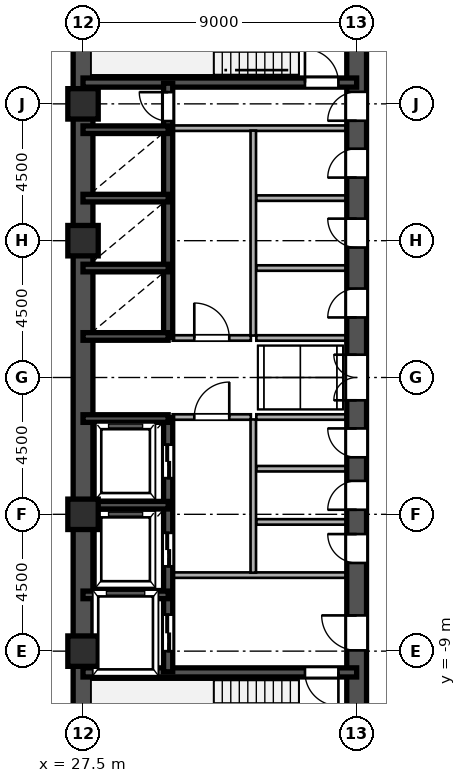
"""IFC4 building model, lengths in metres.
Left out: names, types, materials, properties, quantities, classifications, styles, units other than length and angle.
Written with IfcOpenShell. Run it as: python <this file> out.ifc"""

import sys

from ifc_helpers import new_model, si_unit, direction, frame, frame_2d, origin, origin_2d, place, context, subcontext, project, spatial, rectangle, hollow_rectangle, extrude, source, transform, mapped, element, fill, save


model = new_model("IFC4")
c1 = context("Model", 3, precision=1e-05, world=origin(), true_north=direction((0.0, 1.0)))
c2 = subcontext(c1, "Body", "Model", "MODEL_VIEW")
j1 = project(units=[si_unit("LENGTHUNIT", "METRE"), si_unit("PLANEANGLEUNIT", "RADIAN")], contexts=[c1])
p1 = place(None, origin())
s1 = spatial("IfcSite", under=j1, at=p1, CompositionType="ELEMENT")
p2 = place(p1, origin())
s2 = spatial("IfcBuilding", under=s1, at=p2, CompositionType="ELEMENT")
p3 = place(p2, frame((0.0, 0.0, 99.6)))
s3 = spatial("IfcBuildingStorey", under=s2, at=p3, CompositionType="ELEMENT", Elevation=99.6)
m1 = source(origin(), c2, "Body", "SweptSolid", [
    extrude(hollow_rectangle(XDim=1.0, YDim=1.0, WallThickness=0.042, at=origin_2d()), origin(), (0.0, 0.0, 1.0), 3.6),
])
for number, where, z_axis, x_axis in (
    (1, (27.5, -9.0, 0.0), (0.0, 0.0, 1.0), (1.0, 0.0, 0.0)),
    (2, (27.5, -4.5, 0.0), (0.0, 0.0, 1.0), (1.0, 0.0, 0.0)),
    (3, (27.5, 4.5, 0.0), (0.0, 0.0, 1.0), (1.0, 0.0, 0.0)),
    (4, (27.5, 9.0, 0.0), (0.0, 0.0, 1.0), (1.0, 0.0, 0.0)),
):
    element("IfcColumn", number, at=place(p3, frame(where, z_axis=z_axis, x_axis=x_axis)), inside=s3, PredefinedType="COLUMN", context=c2, shape_type="MappedRepresentation", body=[
        mapped(m1, transform((0.0, 0.0, 0.0), scale=1.0)),
    ])
for number, where, z_axis, x_axis in (
    (5, (27.5, -13.5, 0.0), (0.0, 0.0, 1.0), (0.0, 1.0, 0.0)),
    (6, (27.5, 1.3, 0.0), (0.0, 0.0, 1.0), (0.0, 1.0, 0.0)),
):
    element("IfcWall", number, at=place(p3, frame(where, z_axis=z_axis, x_axis=x_axis)), inside=s3, PredefinedType="SHEAR", context=c2, shape_type="SweptSolid", body=[
        extrude(rectangle(XDim=12.2, YDim=0.65, at=frame_2d((6.1, 0.0))), origin(), (0.0, 0.0, 1.0), 3.38),
    ])
p4 = place(p3, frame((27.5, -1.3, 0.0), z_axis=(0.0, 0.0, 1.0), x_axis=(0.0, 1.0, 0.0)))
e7 = element("IfcWall", 7, at=p4, inside=s3, PredefinedType="SHEAR", context=c2, shape_type="SweptSolid", body=[
    extrude(rectangle(XDim=2.6, YDim=0.65, at=frame_2d((1.3, 0.0))), origin(), (0.0, 0.0, 1.0), 3.38),
])
p5 = place(p3, frame((36.5, -13.65, 0.0), z_axis=(0.0, 0.0, 1.0), x_axis=(0.0, 1.0, 0.0)))
e8 = element("IfcWall", 8, at=p5, inside=s3, PredefinedType="SHEAR", context=c2, shape_type="SweptSolid", body=[
    extrude(rectangle(XDim=7.15, YDim=0.65, at=frame_2d((3.575, 0.0))), origin(), (0.0, 0.0, 1.0), 3.38),
])
p6 = place(p5, frame((4.675, 0.0, 0.0)))
e9 = element("IfcOpeningElement", 9, at=p6, cuts=e8, PredefinedType="OPENING", context=c2, shape_type="SweptSolid", body=[
    extrude(rectangle(XDim=1.15, YDim=2.2, at=frame_2d((0.575, 1.1))), frame((0.0, 0.335, 0.0), z_axis=(0.0, -1.0, 0.0), x_axis=(1.0, 0.0, 0.0)), (0.0, 0.0, 1.0), 0.67),
])
p7 = place(p3, frame((36.5, -1.3, 0.0), z_axis=(0.0, 0.0, 1.0), x_axis=(0.0, 1.0, 0.0)))
e10 = element("IfcWall", 10, at=p7, inside=s3, PredefinedType="SHEAR", context=c2, shape_type="SweptSolid", body=[
    extrude(rectangle(XDim=2.6, YDim=0.65, at=frame_2d((1.3, 0.0))), origin(), (0.0, 0.0, 1.0), 3.38),
])
p8 = place(p7, frame((0.55, 0.0, 0.0)))
e11 = element("IfcOpeningElement", 11, at=p8, cuts=e10, PredefinedType="OPENING", context=c2, shape_type="SweptSolid", body=[
    extrude(rectangle(XDim=1.5, YDim=2.3, at=frame_2d((0.75, 1.15))), frame((0.0, 0.335, 0.0), z_axis=(0.0, -1.0, 0.0), x_axis=(1.0, 0.0, 0.0)), (0.0, 0.0, 1.0), 0.67),
])
p9 = place(p3, frame((36.5, 8.2, 0.0), z_axis=(0.0, 0.0, 1.0), x_axis=(0.0, 1.0, 0.0)))
e12 = element("IfcWall", 12, at=p9, inside=s3, PredefinedType="SHEAR", context=c2, shape_type="SweptSolid", body=[
    extrude(rectangle(XDim=5.45, YDim=0.65, at=frame_2d((2.725, 0.0))), origin(), (0.0, 0.0, 1.0), 3.38),
])
p10 = place(p9, frame((0.245, 0.0, 0.0)))
e13 = element("IfcOpeningElement", 13, at=p10, cuts=e12, PredefinedType="OPENING", context=c2, shape_type="SweptSolid", body=[
    extrude(rectangle(XDim=0.95, YDim=2.15, at=frame_2d((0.475, 1.075))), frame((0.0, 0.335, 0.0), z_axis=(0.0, -1.0, 0.0), x_axis=(1.0, 0.0, 0.0)), (0.0, 0.0, 1.0), 0.67),
])
p11 = place(p3, frame((36.5, -6.5, 0.0), z_axis=(0.0, 0.0, 1.0), x_axis=(0.0, 1.0, 0.0)))
e14 = element("IfcWall", 14, at=p11, inside=s3, PredefinedType="SHEAR", context=c2, shape_type="SweptSolid", body=[
    extrude(rectangle(XDim=1.75, YDim=0.65, at=frame_2d((0.875, 0.0))), origin(), (0.0, 0.0, 1.0), 3.38),
])
p12 = place(p11, frame((0.4, 0.0, 0.0)))
e15 = element("IfcOpeningElement", 15, at=p12, cuts=e14, PredefinedType="OPENING", context=c2, shape_type="SweptSolid", body=[
    extrude(rectangle(XDim=0.95, YDim=2.15, at=frame_2d((0.475, 1.075))), frame((0.0, 0.335, 0.0), z_axis=(0.0, -1.0, 0.0), x_axis=(1.0, 0.0, 0.0)), (0.0, 0.0, 1.0), 0.67),
])
p13 = place(p3, frame((36.5, -4.75, 0.0), z_axis=(0.0, 0.0, 1.0), x_axis=(0.0, 1.0, 0.0)))
e16 = element("IfcWall", 16, at=p13, inside=s3, PredefinedType="SHEAR", context=c2, shape_type="SweptSolid", body=[
    extrude(rectangle(XDim=1.75, YDim=0.65, at=frame_2d((0.875, 0.0))), origin(), (0.0, 0.0, 1.0), 3.38),
])
p14 = place(p13, frame((0.4, 0.0, 0.0)))
e17 = element("IfcOpeningElement", 17, at=p14, cuts=e16, PredefinedType="OPENING", context=c2, shape_type="SweptSolid", body=[
    extrude(rectangle(XDim=0.95, YDim=2.15, at=frame_2d((0.475, 1.075))), frame((0.0, 0.335, 0.0), z_axis=(0.0, -1.0, 0.0), x_axis=(1.0, 0.0, 0.0)), (0.0, 0.0, 1.0), 0.67),
])
p15 = place(p3, frame((36.5, -3.0, 0.0), z_axis=(0.0, 0.0, 1.0), x_axis=(0.0, 1.0, 0.0)))
e18 = element("IfcWall", 18, at=p15, inside=s3, PredefinedType="SHEAR", context=c2, shape_type="SweptSolid", body=[
    extrude(rectangle(XDim=1.7, YDim=0.65, at=frame_2d((0.85, 0.0))), origin(), (0.0, 0.0, 1.0), 3.38),
])
p16 = place(p15, frame((0.375, 0.0, 0.0)))
e19 = element("IfcOpeningElement", 19, at=p16, cuts=e18, PredefinedType="OPENING", context=c2, shape_type="SweptSolid", body=[
    extrude(rectangle(XDim=0.95, YDim=2.15, at=frame_2d((0.475, 1.075))), frame((0.0, 0.335, 0.0), z_axis=(0.0, -1.0, 0.0), x_axis=(1.0, 0.0, 0.0)), (0.0, 0.0, 1.0), 0.67),
])
p17 = place(p3, frame((36.5, 1.3, 0.0), z_axis=(0.0, 0.0, 1.0), x_axis=(0.0, 1.0, 0.0)))
e20 = element("IfcWall", 20, at=p17, inside=s3, PredefinedType="SHEAR", context=c2, shape_type="SweptSolid", body=[
    extrude(rectangle(XDim=2.3, YDim=0.65, at=frame_2d((1.15, 0.0))), origin(), (0.0, 0.0, 1.0), 3.38),
])
p18 = place(p17, frame((0.675, 0.0, 0.0)))
e21 = element("IfcOpeningElement", 21, at=p18, cuts=e20, PredefinedType="OPENING", context=c2, shape_type="SweptSolid", body=[
    extrude(rectangle(XDim=0.95, YDim=2.15, at=frame_2d((0.475, 1.075))), frame((0.0, 0.335, 0.0), z_axis=(0.0, -1.0, 0.0), x_axis=(1.0, 0.0, 0.0)), (0.0, 0.0, 1.0), 0.67),
])
p19 = place(p3, frame((36.5, 3.6, 0.0), z_axis=(0.0, 0.0, 1.0), x_axis=(0.0, 1.0, 0.0)))
e22 = element("IfcWall", 22, at=p19, inside=s3, PredefinedType="SHEAR", context=c2, shape_type="SweptSolid", body=[
    extrude(rectangle(XDim=2.3, YDim=0.65, at=frame_2d((1.15, 0.0))), origin(), (0.0, 0.0, 1.0), 3.38),
])
p20 = place(p19, frame((0.675, 0.0, 0.0)))
e23 = element("IfcOpeningElement", 23, at=p20, cuts=e22, PredefinedType="OPENING", context=c2, shape_type="SweptSolid", body=[
    extrude(rectangle(XDim=0.95, YDim=2.15, at=frame_2d((0.475, 1.075))), frame((0.0, 0.335, 0.0), z_axis=(0.0, -1.0, 0.0), x_axis=(1.0, 0.0, 0.0)), (0.0, 0.0, 1.0), 0.67),
])
p21 = place(p3, frame((36.5, 5.9, 0.0), z_axis=(0.0, 0.0, 1.0), x_axis=(0.0, 1.0, 0.0)))
e24 = element("IfcWall", 24, at=p21, inside=s3, PredefinedType="SHEAR", context=c2, shape_type="SweptSolid", body=[
    extrude(rectangle(XDim=2.3, YDim=0.65, at=frame_2d((1.15, 0.0))), origin(), (0.0, 0.0, 1.0), 3.38),
])
p22 = place(p21, frame((0.675, 0.0, 0.0)))
e25 = element("IfcOpeningElement", 25, at=p22, cuts=e24, PredefinedType="OPENING", context=c2, shape_type="SweptSolid", body=[
    extrude(rectangle(XDim=0.95, YDim=2.15, at=frame_2d((0.475, 1.075))), frame((0.0, 0.335, 0.0), z_axis=(0.0, -1.0, 0.0), x_axis=(1.0, 0.0, 0.0)), (0.0, 0.0, 1.0), 0.67),
])
p23 = place(p3, frame((27.5, -9.7, 0.0), z_axis=(0.0, 0.0, 1.0), x_axis=(1.0, 0.0, 0.0)))
e26 = element("IfcWall", 26, at=p23, inside=s3, PredefinedType="SHEAR", context=c2, shape_type="SweptSolid", body=[
    extrude(rectangle(XDim=9.0, YDim=0.3, at=frame_2d((4.5, 0.0))), origin(), (0.0, 0.0, 1.0), 3.38),
])
p24 = place(p23, frame((7.3, 0.0, 0.0)))
e27 = element("IfcOpeningElement", 27, at=p24, cuts=e26, PredefinedType="OPENING", context=c2, shape_type="SweptSolid", body=[
    extrude(rectangle(XDim=1.1, YDim=2.2, at=frame_2d((0.55, 1.1))), frame((0.0, 0.16, 0.0), z_axis=(0.0, -1.0, 0.0), x_axis=(1.0, 0.0, 0.0)), (0.0, 0.0, 1.0), 0.32),
])
p25 = place(p3, frame((27.5, 9.7, 0.0), z_axis=(0.0, 0.0, 1.0), x_axis=(1.0, 0.0, 0.0)))
e28 = element("IfcWall", 28, at=p25, inside=s3, PredefinedType="SHEAR", context=c2, shape_type="SweptSolid", body=[
    extrude(rectangle(XDim=9.0, YDim=0.3, at=frame_2d((4.5, 0.0))), origin(), (0.0, 0.0, 1.0), 3.38),
])
p26 = place(p25, frame((7.3, 0.0, 0.0)))
e29 = element("IfcOpeningElement", 29, at=p26, cuts=e28, PredefinedType="OPENING", context=c2, shape_type="SweptSolid", body=[
    extrude(rectangle(XDim=1.1, YDim=2.2, at=frame_2d((0.55, 1.1))), frame((0.0, 0.16, 0.0), z_axis=(0.0, -1.0, 0.0), x_axis=(1.0, 0.0, 0.0)), (0.0, 0.0, 1.0), 0.32),
])
for number, where, z_axis, x_axis in (
    (30, (27.5, -7.15, 0.0), (0.0, 0.0, 1.0), (1.0, 0.0, 0.0)),
    (31, (27.5, -4.2, 0.0), (0.0, 0.0, 1.0), (1.0, 0.0, 0.0)),
    (32, (27.5, -1.35, 0.0), (0.0, 0.0, 1.0), (1.0, 0.0, 0.0)),
    (33, (27.5, 1.35, 0.0), (0.0, 0.0, 1.0), (1.0, 0.0, 0.0)),
    (34, (27.5, 3.6, 0.0), (0.0, 0.0, 1.0), (1.0, 0.0, 0.0)),
    (35, (27.5, 5.9, 0.0), (0.0, 0.0, 1.0), (1.0, 0.0, 0.0)),
    (36, (27.5, 8.15, 0.0), (0.0, 0.0, 1.0), (1.0, 0.0, 0.0)),
):
    element("IfcWall", number, at=place(p3, frame(where, z_axis=z_axis, x_axis=x_axis)), inside=s3, PredefinedType="SHEAR", context=c2, shape_type="SweptSolid", body=[
        extrude(rectangle(XDim=2.8, YDim=0.25, at=frame_2d((1.4, 0.0))), origin(), (0.0, 0.0, 1.0), 3.38),
    ])
p27 = place(p3, frame((30.3, -9.68, 0.0), z_axis=(0.0, 0.0, 1.0), x_axis=(0.0, 1.0, 0.0)))
e37 = element("IfcWall", 37, at=p27, inside=s3, PredefinedType="SHEAR", context=c2, shape_type="SweptSolid", body=[
    extrude(rectangle(XDim=2.56, YDim=0.3, at=frame_2d((1.28, 0.0))), origin(), (0.0, 0.0, 1.0), 3.38),
])
p28 = place(p27, frame((0.68, 0.0, 0.0)))
e38 = element("IfcOpeningElement", 38, at=p28, cuts=e37, PredefinedType="OPENING", context=c2, shape_type="SweptSolid", body=[
    extrude(rectangle(XDim=1.2, YDim=2.25, at=frame_2d((0.6, 1.125))), frame((0.0, 0.16, 0.0), z_axis=(0.0, -1.0, 0.0), x_axis=(1.0, 0.0, 0.0)), (0.0, 0.0, 1.0), 0.32),
])
p29 = place(p3, frame((30.3, -7.12, 0.0), z_axis=(0.0, 0.0, 1.0), x_axis=(0.0, 1.0, 0.0)))
e39 = element("IfcWall", 39, at=p29, inside=s3, PredefinedType="SHEAR", context=c2, shape_type="SweptSolid", body=[
    extrude(rectangle(XDim=2.92, YDim=0.3, at=frame_2d((1.46, 0.0))), origin(), (0.0, 0.0, 1.0), 3.38),
])
p30 = place(p29, frame((0.91, 0.0, 0.0)))
e40 = element("IfcOpeningElement", 40, at=p30, cuts=e39, PredefinedType="OPENING", context=c2, shape_type="SweptSolid", body=[
    extrude(rectangle(XDim=1.1, YDim=2.2, at=frame_2d((0.55, 1.1))), frame((0.0, 0.16, 0.0), z_axis=(0.0, -1.0, 0.0), x_axis=(1.0, 0.0, 0.0)), (0.0, 0.0, 1.0), 0.32),
])
p31 = place(p3, frame((30.3, -4.2, 0.0), z_axis=(0.0, 0.0, 1.0), x_axis=(0.0, 1.0, 0.0)))
e41 = element("IfcWall", 41, at=p31, inside=s3, PredefinedType="SHEAR", context=c2, shape_type="SweptSolid", body=[
    extrude(rectangle(XDim=2.88, YDim=0.3, at=frame_2d((1.44, 0.0))), origin(), (0.0, 0.0, 1.0), 3.38),
])
p32 = place(p31, frame((0.89, 0.0, 0.0)))
e42 = element("IfcOpeningElement", 42, at=p32, cuts=e41, PredefinedType="OPENING", context=c2, shape_type="SweptSolid", body=[
    extrude(rectangle(XDim=1.1, YDim=2.2, at=frame_2d((0.55, 1.1))), frame((0.0, 0.16, 0.0), z_axis=(0.0, -1.0, 0.0), x_axis=(1.0, 0.0, 0.0)), (0.0, 0.0, 1.0), 0.32),
])
p33 = place(p3, frame((30.3, 1.32, 0.0), z_axis=(0.0, 0.0, 1.0), x_axis=(0.0, 1.0, 0.0)))
e43 = element("IfcWall", 43, at=p33, inside=s3, PredefinedType="SHEAR", context=c2, shape_type="SweptSolid", body=[
    extrude(rectangle(XDim=2.28, YDim=0.3, at=frame_2d((1.14, 0.0))), origin(), (0.0, 0.0, 1.0), 3.38),
])
p34 = place(p3, frame((30.3, 3.6, 0.0), z_axis=(0.0, 0.0, 1.0), x_axis=(0.0, 1.0, 0.0)))
e44 = element("IfcWall", 44, at=p34, inside=s3, PredefinedType="SHEAR", context=c2, shape_type="SweptSolid", body=[
    extrude(rectangle(XDim=2.3, YDim=0.3, at=frame_2d((1.15, 0.0))), origin(), (0.0, 0.0, 1.0), 3.38),
])
p35 = place(p3, frame((30.3, 5.9, 0.0), z_axis=(0.0, 0.0, 1.0), x_axis=(0.0, 1.0, 0.0)))
e45 = element("IfcWall", 45, at=p35, inside=s3, PredefinedType="SHEAR", context=c2, shape_type="SweptSolid", body=[
    extrude(rectangle(XDim=2.25, YDim=0.3, at=frame_2d((1.125, 0.0))), origin(), (0.0, 0.0, 1.0), 3.38),
])
p36 = place(p3, frame((30.3, 8.15, 0.0), z_axis=(0.0, 0.0, 1.0), x_axis=(0.0, 1.0, 0.0)))
e46 = element("IfcWall", 46, at=p36, inside=s3, PredefinedType="SHEAR", context=c2, shape_type="SweptSolid", body=[
    extrude(rectangle(XDim=1.53, YDim=0.3, at=frame_2d((0.765, 0.0))), origin(), (0.0, 0.0, 1.0), 3.38),
])
p37 = place(p36, frame((0.285, 0.0, 0.0)))
e47 = element("IfcOpeningElement", 47, at=p37, cuts=e46, PredefinedType="OPENING", context=c2, shape_type="SweptSolid", body=[
    extrude(rectangle(XDim=0.95, YDim=2.15, at=frame_2d((0.475, 1.075))), frame((0.0, 0.16, 0.0), z_axis=(0.0, -1.0, 0.0), x_axis=(1.0, 0.0, 0.0)), (0.0, 0.0, 1.0), 0.32),
])
for number, where, z_axis, x_axis in (
    (48, (30.45, -6.5, 0.0), (0.0, 0.0, 1.0), (1.0, 0.0, 0.0)),
    (49, (30.45, 8.2, 0.0), (0.0, 0.0, 1.0), (1.0, 0.0, 0.0)),
):
    element("IfcWall", number, at=place(p3, frame(where, z_axis=z_axis, x_axis=x_axis)), inside=s3, PredefinedType="PARTITIONING", context=c2, shape_type="SweptSolid", body=[
        extrude(rectangle(XDim=5.7, YDim=0.18, at=frame_2d((2.85, 0.0))), origin(), (0.0, 0.0, 1.0), 3.38),
    ])
p38 = place(p3, frame((33.1, -6.42, 0.0), z_axis=(0.0, 0.0, 1.0), x_axis=(0.0, 1.0, 0.0)))
e50 = element("IfcWall", 50, at=p38, inside=s3, PredefinedType="PARTITIONING", context=c2, shape_type="SweptSolid", body=[
    extrude(rectangle(XDim=5.04, YDim=0.18, at=frame_2d((2.52, 0.0))), origin(), (0.0, 0.0, 1.0), 3.38),
])
p39 = place(p3, frame((33.1, 1.38, 0.0), z_axis=(0.0, 0.0, 1.0), x_axis=(0.0, 1.0, 0.0)))
e51 = element("IfcWall", 51, at=p39, inside=s3, PredefinedType="PARTITIONING", context=c2, shape_type="SweptSolid", body=[
    extrude(rectangle(XDim=6.74, YDim=0.18, at=frame_2d((3.37, 0.0))), origin(), (0.0, 0.0, 1.0), 3.38),
])
p40 = place(p3, frame((30.45, -1.3, 0.0), z_axis=(0.0, 0.0, 1.0), x_axis=(1.0, 0.0, 0.0)))
e52 = element("IfcWall", 52, at=p40, inside=s3, PredefinedType="PARTITIONING", context=c2, shape_type="SweptSolid", body=[
    extrude(rectangle(XDim=2.57, YDim=0.18, at=frame_2d((1.285, 0.0))), origin(), (0.0, 0.0, 1.0), 3.38),
])
p41 = place(p40, frame((0.71, 0.0, 0.0)))
e53 = element("IfcOpeningElement", 53, at=p41, cuts=e52, PredefinedType="OPENING", context=c2, shape_type="SweptSolid", body=[
    extrude(rectangle(XDim=1.15, YDim=2.2, at=frame_2d((0.575, 1.1))), frame((0.0, 0.1, 0.0), z_axis=(0.0, -1.0, 0.0), x_axis=(1.0, 0.0, 0.0)), (0.0, 0.0, 1.0), 0.2),
])
p42 = place(p3, frame((30.45, 1.3, 0.0), z_axis=(0.0, 0.0, 1.0), x_axis=(1.0, 0.0, 0.0)))
e54 = element("IfcWall", 54, at=p42, inside=s3, PredefinedType="PARTITIONING", context=c2, shape_type="SweptSolid", body=[
    extrude(rectangle(XDim=2.57, YDim=0.18, at=frame_2d((1.285, 0.0))), origin(), (0.0, 0.0, 1.0), 3.38),
])
p43 = place(p42, frame((0.71, 0.0, 0.0)))
e55 = element("IfcOpeningElement", 55, at=p43, cuts=e54, PredefinedType="OPENING", context=c2, shape_type="SweptSolid", body=[
    extrude(rectangle(XDim=1.15, YDim=2.2, at=frame_2d((0.575, 1.1))), frame((0.0, 0.1, 0.0), z_axis=(0.0, -1.0, 0.0), x_axis=(1.0, 0.0, 0.0)), (0.0, 0.0, 1.0), 0.2),
])
for number, where, z_axis, x_axis in (
    (56, (33.2, -1.3, 0.0), (0.0, 0.0, 1.0), (1.0, 0.0, 0.0)),
    (57, (33.2, 1.3, 0.0), (0.0, 0.0, 1.0), (1.0, 0.0, 0.0)),
    (58, (33.2, -4.75, 0.0), (0.0, 0.0, 1.0), (1.0, 0.0, 0.0)),
    (59, (33.2, -3.0, 0.0), (0.0, 0.0, 1.0), (1.0, 0.0, 0.0)),
    (60, (33.2, 3.6, 0.0), (0.0, 0.0, 1.0), (1.0, 0.0, 0.0)),
    (61, (33.2, 5.9, 0.0), (0.0, 0.0, 1.0), (1.0, 0.0, 0.0)),
):
    element("IfcWall", number, at=place(p3, frame(where, z_axis=z_axis, x_axis=x_axis)), inside=s3, PredefinedType="PARTITIONING", context=c2, shape_type="SweptSolid", body=[
        extrude(rectangle(XDim=2.95, YDim=0.18, at=frame_2d((1.475, 0.0))), origin(), (0.0, 0.0, 1.0), 3.38),
    ])
m2 = source(origin(), c2, "Body", "SweptSolid", [
    extrude(rectangle(XDim=1.15, YDim=2.2, at=frame_2d((0.575, 1.1))), frame((0.0, 0.025, 0.0), z_axis=(0.0, -1.0, 0.0), x_axis=(1.0, 0.0, 0.0)), (0.0, 0.0, 1.0), 0.05),
])
p44 = place(p6, origin())
e62 = element("IfcDoor", 62, at=p44, inside=s3, OperationType="SINGLE_SWING_RIGHT", PredefinedType="DOOR", context=c2, shape_type="MappedRepresentation", body=[
    mapped(m2, transform((0.0, 0.0, 0.0), scale=1.0)),
])
fill(e9, e62)
m3 = source(origin(), c2, "Body", "SweptSolid", [
    extrude(rectangle(XDim=1.5, YDim=2.3, at=frame_2d((0.75, 1.15))), frame((0.0, 0.025, 0.0), z_axis=(0.0, -1.0, 0.0), x_axis=(1.0, 0.0, 0.0)), (0.0, 0.0, 1.0), 0.05),
])
p45 = place(p8, origin())
e63 = element("IfcDoor", 63, at=p45, inside=s3, OperationType="DOUBLE_SWING_LEFT", PredefinedType="DOOR", context=c2, shape_type="MappedRepresentation", body=[
    mapped(m3, transform((0.0, 0.0, 0.0), scale=1.0)),
])
fill(e11, e63)
m4 = source(origin(), c2, "Body", "SweptSolid", [
    extrude(rectangle(XDim=0.95, YDim=2.15, at=frame_2d((0.475, 1.075))), frame((0.0, 0.025, 0.0), z_axis=(0.0, -1.0, 0.0), x_axis=(1.0, 0.0, 0.0)), (0.0, 0.0, 1.0), 0.05),
])
p46 = place(p10, origin())
e64 = element("IfcDoor", 64, at=p46, inside=s3, OperationType="SINGLE_SWING_LEFT", PredefinedType="DOOR", context=c2, shape_type="MappedRepresentation", body=[
    mapped(m4, transform((0.0, 0.0, 0.0), scale=1.0)),
])
fill(e13, e64)
p47 = place(p12, origin())
e65 = element("IfcDoor", 65, at=p47, inside=s3, OperationType="SINGLE_SWING_RIGHT", PredefinedType="DOOR", context=c2, shape_type="MappedRepresentation", body=[
    mapped(m4, transform((0.0, 0.0, 0.0), scale=1.0)),
])
fill(e15, e65)
p48 = place(p14, origin())
e66 = element("IfcDoor", 66, at=p48, inside=s3, OperationType="SINGLE_SWING_LEFT", PredefinedType="DOOR", context=c2, shape_type="MappedRepresentation", body=[
    mapped(m4, transform((0.0, 0.0, 0.0), scale=1.0)),
])
fill(e17, e66)
p49 = place(p16, origin())
e67 = element("IfcDoor", 67, at=p49, inside=s3, OperationType="SINGLE_SWING_RIGHT", PredefinedType="DOOR", context=c2, shape_type="MappedRepresentation", body=[
    mapped(m4, transform((0.0, 0.0, 0.0), scale=1.0)),
])
fill(e19, e67)
p50 = place(p18, origin())
e68 = element("IfcDoor", 68, at=p50, inside=s3, OperationType="SINGLE_SWING_LEFT", PredefinedType="DOOR", context=c2, shape_type="MappedRepresentation", body=[
    mapped(m4, transform((0.0, 0.0, 0.0), scale=1.0)),
])
fill(e21, e68)
p51 = place(p20, origin())
e69 = element("IfcDoor", 69, at=p51, inside=s3, OperationType="SINGLE_SWING_RIGHT", PredefinedType="DOOR", context=c2, shape_type="MappedRepresentation", body=[
    mapped(m4, transform((0.0, 0.0, 0.0), scale=1.0)),
])
fill(e23, e69)
p52 = place(p22, origin())
e70 = element("IfcDoor", 70, at=p52, inside=s3, OperationType="SINGLE_SWING_LEFT", PredefinedType="DOOR", context=c2, shape_type="MappedRepresentation", body=[
    mapped(m4, transform((0.0, 0.0, 0.0), scale=1.0)),
])
fill(e25, e70)
m5 = source(origin(), c2, "Body", "SweptSolid", [
    extrude(rectangle(XDim=1.1, YDim=2.2, at=frame_2d((0.55, 1.1))), frame((0.0, 0.025, 0.0), z_axis=(0.0, -1.0, 0.0), x_axis=(1.0, 0.0, 0.0)), (0.0, 0.0, 1.0), 0.05),
])
p53 = place(p24, frame((1.1, 0.0, 0.0), z_axis=(0.0, 0.0, 1.0), x_axis=(-1.0, 0.0, 0.0)))
e71 = element("IfcDoor", 71, at=p53, inside=s3, OperationType="SINGLE_SWING_RIGHT", PredefinedType="DOOR", context=c2, shape_type="MappedRepresentation", body=[
    mapped(m5, transform((0.0, 0.0, 0.0), scale=1.0)),
])
fill(e27, e71)
p54 = place(p26, origin())
e72 = element("IfcDoor", 72, at=p54, inside=s3, OperationType="SINGLE_SWING_LEFT", PredefinedType="DOOR", context=c2, shape_type="MappedRepresentation", body=[
    mapped(m5, transform((0.0, 0.0, 0.0), scale=1.0)),
])
fill(e29, e72)
m6 = source(origin(), c2, "Body", "SweptSolid", [
    extrude(rectangle(XDim=1.2, YDim=2.25, at=frame_2d((0.6, 1.125))), frame((0.0, 0.025, 0.0), z_axis=(0.0, -1.0, 0.0), x_axis=(1.0, 0.0, 0.0)), (0.0, 0.0, 1.0), 0.05),
])
p55 = place(p28, origin())
e73 = element("IfcDoor", 73, at=p55, inside=s3, OperationType="DOUBLE_DOOR_SLIDING", PredefinedType="DOOR", context=c2, shape_type="MappedRepresentation", body=[
    mapped(m6, transform((0.0, 0.0, 0.0), scale=1.0)),
])
fill(e38, e73)
m7 = source(origin(), c2, "Body", "SweptSolid", [
    extrude(rectangle(XDim=1.1, YDim=2.2, at=frame_2d((0.55, 1.1))), frame((0.0, 0.025, 0.0), z_axis=(0.0, -1.0, 0.0), x_axis=(1.0, 0.0, 0.0)), (0.0, 0.0, 1.0), 0.05),
])
p56 = place(p30, origin())
e74 = element("IfcDoor", 74, at=p56, inside=s3, OperationType="DOUBLE_DOOR_SLIDING", PredefinedType="DOOR", context=c2, shape_type="MappedRepresentation", body=[
    mapped(m7, transform((0.0, 0.0, 0.0), scale=1.0)),
])
fill(e40, e74)
p57 = place(p32, origin())
e75 = element("IfcDoor", 75, at=p57, inside=s3, OperationType="DOUBLE_DOOR_SLIDING", PredefinedType="DOOR", context=c2, shape_type="MappedRepresentation", body=[
    mapped(m7, transform((0.0, 0.0, 0.0), scale=1.0)),
])
fill(e42, e75)
p58 = place(p37, origin())
e76 = element("IfcDoor", 76, at=p58, inside=s3, OperationType="SINGLE_SWING_RIGHT", PredefinedType="DOOR", context=c2, shape_type="MappedRepresentation", body=[
    mapped(m4, transform((0.0, 0.0, 0.0), scale=1.0)),
])
fill(e47, e76)
p59 = place(p41, origin())
e77 = element("IfcDoor", 77, at=p59, inside=s3, OperationType="SINGLE_SWING_RIGHT", PredefinedType="DOOR", context=c2, shape_type="MappedRepresentation", body=[
    mapped(m2, transform((0.0, 0.0, 0.0), scale=1.0)),
])
fill(e53, e77)
p60 = place(p43, origin())
e78 = element("IfcDoor", 78, at=p60, inside=s3, OperationType="SINGLE_SWING_LEFT", PredefinedType="DOOR", context=c2, shape_type="MappedRepresentation", body=[
    mapped(m2, transform((0.0, 0.0, 0.0), scale=1.0)),
])
fill(e55, e78)
save(model, sys.argv[1])
